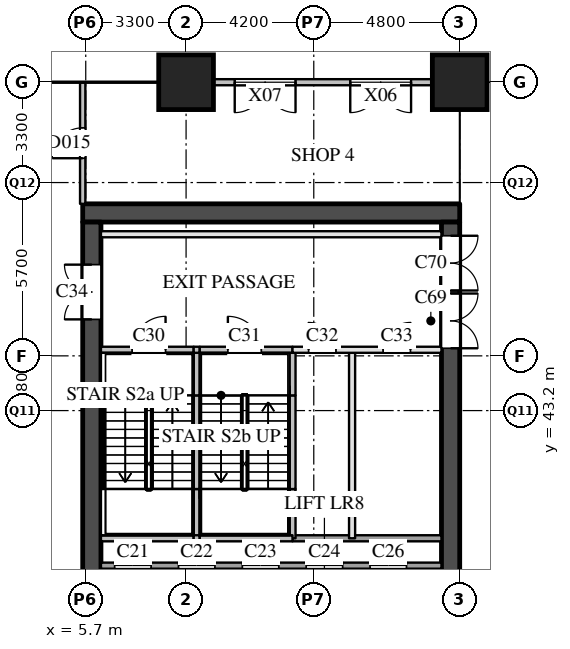
"""IFC4 building model, lengths in metres.
Left out: names, types, materials, properties, quantities, classifications, styles, units other than length and angle.
Written with IfcOpenShell. Run it as: python <this file> out.ifc"""

import sys

from ifc_helpers import new_model, si_unit, direction, frame, frame_2d, origin, origin_2d, place, context, subcontext, project, spatial, rectangle, extrude, element, fill, save


model = new_model("IFC4")
c1 = context("Model", 3, precision=1e-05, world=origin(), true_north=direction((0.0, 1.0)))
c2 = subcontext(c1, "Body", "Model", "MODEL_VIEW")
j1 = project(units=[si_unit("LENGTHUNIT", "METRE"), si_unit("PLANEANGLEUNIT", "RADIAN")], contexts=[c1])
p1 = place(None, origin())
s1 = spatial("IfcSite", under=j1, at=p1, CompositionType="ELEMENT")
p2 = place(p1, origin())
s2 = spatial("IfcBuilding", under=s1, at=p2, CompositionType="ELEMENT")
p3 = place(p2, origin())
s3 = spatial("IfcBuildingStorey", under=s2, at=p3, CompositionType="ELEMENT", Elevation=0.0)
for number, where, z_axis, x_axis in (
    (1, (9.0, 54.0, 0.0), (0.0, 0.0, 1.0), (1.0, 0.0, 0.0)),
    (2, (18.0, 54.0, 0.0), (0.0, 0.0, 1.0), (1.0, 0.0, 0.0)),
):
    element("IfcColumn", number, at=place(p3, frame(where, z_axis=z_axis, x_axis=x_axis)), inside=s3, PredefinedType="COLUMN", context=c2, shape_type="SweptSolid", body=[
        extrude(rectangle(XDim=1.8, YDim=1.8, at=origin_2d()), origin(), (0.0, 0.0, 1.0), 8.0),
    ])
p4 = place(p3, frame((17.1, 54.0, 0.0), z_axis=(0.0, 0.0, 1.0), x_axis=(-1.0, 0.0, 0.0)))
e3 = element("IfcWall", 3, at=p4, inside=s3, PredefinedType="SOLIDWALL", context=c2, shape_type="SweptSolid", body=[
    extrude(rectangle(XDim=7.2, YDim=0.2, at=frame_2d((3.6, 0.0))), origin(), (0.0, 0.0, 1.0), 6.59),
])
p5 = place(p4, frame((0.7, 0.0, 0.0)))
e4 = element("IfcOpeningElement", 4, at=p5, cuts=e3, PredefinedType="OPENING", context=c2, shape_type="SweptSolid", body=[
    extrude(rectangle(XDim=2.0, YDim=2.4, at=frame_2d((1.0, 1.2))), frame((0.0, 0.11, 0.0), z_axis=(0.0, -1.0, 0.0), x_axis=(1.0, 0.0, 0.0)), (0.0, 0.0, 1.0), 0.22),
])
p6 = place(p4, frame((0.7, 0.0, 2.5)))
e5 = element("IfcOpeningElement", 5, at=p6, cuts=e3, PredefinedType="OPENING", context=c2, shape_type="SweptSolid", body=[
    extrude(rectangle(XDim=2.0, YDim=3.99, at=frame_2d((1.0, 1.995))), frame((0.0, 0.11, 0.0), z_axis=(0.0, -1.0, 0.0), x_axis=(1.0, 0.0, 0.0)), (0.0, 0.0, 1.0), 0.22),
])
p7 = place(p4, frame((4.5, 0.0, 0.0)))
e6 = element("IfcOpeningElement", 6, at=p7, cuts=e3, PredefinedType="OPENING", context=c2, shape_type="SweptSolid", body=[
    extrude(rectangle(XDim=2.0, YDim=2.4, at=frame_2d((1.0, 1.2))), frame((0.0, 0.11, 0.0), z_axis=(0.0, -1.0, 0.0), x_axis=(1.0, 0.0, 0.0)), (0.0, 0.0, 1.0), 0.22),
])
p8 = place(p4, frame((4.5, 0.0, 2.5)))
e7 = element("IfcOpeningElement", 7, at=p8, cuts=e3, PredefinedType="OPENING", context=c2, shape_type="SweptSolid", body=[
    extrude(rectangle(XDim=2.0, YDim=3.99, at=frame_2d((1.0, 1.995))), frame((0.0, 0.11, 0.0), z_axis=(0.0, -1.0, 0.0), x_axis=(1.0, 0.0, 0.0)), (0.0, 0.0, 1.0), 0.22),
])
p9 = place(p3, frame((5.6, 49.7, 0.0), z_axis=(0.0, 0.0, 1.0), x_axis=(1.0, 0.0, 0.0)))
e8 = element("IfcWall", 8, at=p9, inside=s3, PredefinedType="SHEAR", context=c2, shape_type="SweptSolid", body=[
    extrude(rectangle(XDim=12.4, YDim=0.6, at=frame_2d((6.2, 0.0))), origin(), (0.0, 0.0, 1.0), 7.59),
])
p10 = place(p3, frame((5.9, 29.1, 0.0), z_axis=(0.0, 0.0, 1.0), x_axis=(0.0, 1.0, 0.0)))
e9 = element("IfcWall", 9, at=p10, inside=s3, PredefinedType="SHEAR", context=c2, shape_type="SweptSolid", body=[
    extrude(rectangle(XDim=20.3, YDim=0.6, at=frame_2d((10.15, 0.0))), origin(), (0.0, 0.0, 1.0), 7.59),
])
p11 = place(p10, frame((3.6, 0.0, 0.0)))
e10 = element("IfcOpeningElement", 10, at=p11, cuts=e9, PredefinedType="OPENING", context=c2, shape_type="SweptSolid", body=[
    extrude(rectangle(XDim=1.8, YDim=2.1, at=frame_2d((0.9, 1.05))), frame((0.0, 0.31, 0.0), z_axis=(0.0, -1.0, 0.0), x_axis=(1.0, 0.0, 0.0)), (0.0, 0.0, 1.0), 0.62),
])
p12 = place(p10, frame((17.1, 0.0, 0.0)))
e11 = element("IfcOpeningElement", 11, at=p12, cuts=e9, PredefinedType="OPENING", context=c2, shape_type="SweptSolid", body=[
    extrude(rectangle(XDim=1.8, YDim=2.1, at=frame_2d((0.9, 1.05))), frame((0.0, 0.31, 0.0), z_axis=(0.0, -1.0, 0.0), x_axis=(1.0, 0.0, 0.0)), (0.0, 0.0, 1.0), 0.62),
])
p13 = place(p3, frame((17.7, 29.1, 0.0), z_axis=(0.0, 0.0, 1.0), x_axis=(0.0, 1.0, 0.0)))
e12 = element("IfcWall", 12, at=p13, inside=s3, PredefinedType="SHEAR", context=c2, shape_type="SweptSolid", body=[
    extrude(rectangle(XDim=20.3, YDim=0.6, at=frame_2d((10.15, 0.0))), origin(), (0.0, 0.0, 1.0), 7.59),
])
p14 = place(p13, frame((1.25, 0.0, 0.0)))
e13 = element("IfcOpeningElement", 13, at=p14, cuts=e12, PredefinedType="OPENING", context=c2, shape_type="SweptSolid", body=[
    extrude(rectangle(XDim=0.7, YDim=2.1, at=frame_2d((0.35, 1.05))), frame((0.0, 0.31, 0.0), z_axis=(0.0, -1.0, 0.0), x_axis=(1.0, 0.0, 0.0)), (0.0, 0.0, 1.0), 0.62),
])
p15 = place(p13, frame((7.05, 0.0, 0.0)))
e14 = element("IfcOpeningElement", 14, at=p15, cuts=e12, PredefinedType="OPENING", context=c2, shape_type="SweptSolid", body=[
    extrude(rectangle(XDim=0.7, YDim=2.1, at=frame_2d((0.35, 1.05))), frame((0.0, 0.31, 0.0), z_axis=(0.0, -1.0, 0.0), x_axis=(1.0, 0.0, 0.0)), (0.0, 0.0, 1.0), 0.62),
])
p16 = place(p13, frame((17.95, 0.0, 0.0), z_axis=(0.0, 0.0, 1.0), x_axis=(-1.0, 0.0, 0.0)))
e15 = element("IfcOpeningElement", 15, at=p16, cuts=e12, PredefinedType="OPENING", context=c2, shape_type="SweptSolid", body=[
    extrude(rectangle(XDim=1.8, YDim=2.4, at=frame_2d((0.9, 1.2))), frame((0.0, 0.31, 0.0), z_axis=(0.0, -1.0, 0.0), x_axis=(1.0, 0.0, 0.0)), (0.0, 0.0, 1.0), 0.62),
])
p17 = place(p13, frame((19.85, 0.0, 0.0), z_axis=(0.0, 0.0, 1.0), x_axis=(-1.0, 0.0, 0.0)))
e16 = element("IfcOpeningElement", 16, at=p17, cuts=e12, PredefinedType="OPENING", context=c2, shape_type="SweptSolid", body=[
    extrude(rectangle(XDim=1.8, YDim=2.4, at=frame_2d((0.9, 1.2))), frame((0.0, 0.31, 0.0), z_axis=(0.0, -1.0, 0.0), x_axis=(1.0, 0.0, 0.0)), (0.0, 0.0, 1.0), 0.62),
])
p18 = place(p3, frame((8.3, 34.9, 0.0), z_axis=(0.0, 0.0, 1.0), x_axis=(0.0, 1.0, 0.0)))
e17 = element("IfcWall", 17, at=p18, inside=s3, PredefinedType="SOLIDWALL", context=c2, shape_type="SweptSolid", body=[
    extrude(rectangle(XDim=3.2, YDim=0.2, at=frame_2d((1.6, 0.0))), origin(), (0.0, 0.0, 1.0), 7.59),
])
p19 = place(p3, frame((9.35, 39.0, 0.0), z_axis=(0.0, 0.0, 1.0), x_axis=(0.0, 1.0, 0.0)))
e18 = element("IfcWall", 18, at=p19, inside=s3, PredefinedType="SOLIDWALL", context=c2, shape_type="SweptSolid", body=[
    extrude(rectangle(XDim=1.62, YDim=0.2, at=frame_2d((0.81, 0.0))), origin(), (0.0, 0.0, 1.0), 7.59),
])
p20 = place(p3, frame((9.35, 40.62, 0.0), z_axis=(0.0, 0.0, 1.0), x_axis=(0.0, 1.0, 0.0)))
e19 = element("IfcWall", 19, at=p20, inside=s3, PredefinedType="SOLIDWALL", context=c2, shape_type="SweptSolid", body=[
    extrude(rectangle(XDim=3.08, YDim=0.2, at=frame_2d((1.54, 0.0))), origin(), (0.0, 0.0, 1.0), 7.59),
])
p21 = place(p3, frame((9.35, 43.7, 0.0), z_axis=(0.0, 0.0, 1.0), x_axis=(0.0, 1.0, 0.0)))
e20 = element("IfcWall", 20, at=p21, inside=s3, PredefinedType="SOLIDWALL", context=c2, shape_type="SweptSolid", body=[
    extrude(rectangle(XDim=1.5, YDim=0.2, at=frame_2d((0.75, 0.0))), origin(), (0.0, 0.0, 1.0), 7.59),
])
for number, where, z_axis, x_axis in (
    (21, (10.4, 34.9, 0.0), (0.0, 0.0, 1.0), (0.0, 1.0, 0.0)),
    (22, (12.5, 34.9, 0.0), (0.0, 0.0, 1.0), (0.0, 1.0, 0.0)),
):
    element("IfcWall", number, at=place(p3, frame(where, z_axis=z_axis, x_axis=x_axis)), inside=s3, PredefinedType="SOLIDWALL", context=c2, shape_type="SweptSolid", body=[
        extrude(rectangle(XDim=3.2, YDim=0.2, at=frame_2d((1.6, 0.0))), origin(), (0.0, 0.0, 1.0), 7.59),
    ])
p22 = place(p3, frame((12.5, 39.0, 0.0), z_axis=(0.0, 0.0, 1.0), x_axis=(0.0, 1.0, 0.0)))
e23 = element("IfcWall", 23, at=p22, inside=s3, PredefinedType="SOLIDWALL", context=c2, shape_type="SweptSolid", body=[
    extrude(rectangle(XDim=1.62, YDim=0.2, at=frame_2d((0.81, 0.0))), origin(), (0.0, 0.0, 1.0), 7.59),
])
p23 = place(p3, frame((12.5, 40.62, 0.0), z_axis=(0.0, 0.0, 1.0), x_axis=(0.0, 1.0, 0.0)))
e24 = element("IfcWall", 24, at=p23, inside=s3, PredefinedType="SOLIDWALL", context=c2, shape_type="SweptSolid", body=[
    extrude(rectangle(XDim=3.08, YDim=0.2, at=frame_2d((1.54, 0.0))), origin(), (0.0, 0.0, 1.0), 7.59),
])
p24 = place(p3, frame((12.5, 43.7, 0.0), z_axis=(0.0, 0.0, 1.0), x_axis=(0.0, 1.0, 0.0)))
e25 = element("IfcWall", 25, at=p24, inside=s3, PredefinedType="SOLIDWALL", context=c2, shape_type="SweptSolid", body=[
    extrude(rectangle(XDim=1.5, YDim=0.2, at=frame_2d((0.75, 0.0))), origin(), (0.0, 0.0, 1.0), 7.59),
])
p25 = place(p3, frame((14.46, 39.0, 0.0), z_axis=(0.0, 0.0, 1.0), x_axis=(0.0, 1.0, 0.0)))
e26 = element("IfcWall", 26, at=p25, inside=s3, PredefinedType="PARTITIONING", context=c2, shape_type="SweptSolid", body=[
    extrude(rectangle(XDim=6.2, YDim=0.2, at=frame_2d((3.1, 0.0))), origin(), (0.0, 0.0, 1.0), 7.59),
])
for number, where, z_axis, x_axis in (
    (27, (14.6, 34.9, 0.0), (0.0, 0.0, 1.0), (0.0, 1.0, 0.0)),
    (28, (16.7, 34.9, 0.0), (0.0, 0.0, 1.0), (0.0, 1.0, 0.0)),
):
    element("IfcWall", number, at=place(p3, frame(where, z_axis=z_axis, x_axis=x_axis)), inside=s3, PredefinedType="SOLIDWALL", context=c2, shape_type="SweptSolid", body=[
        extrude(rectangle(XDim=3.2, YDim=0.2, at=frame_2d((1.6, 0.0))), origin(), (0.0, 0.0, 1.0), 7.59),
    ])
p26 = place(p3, frame((6.2, 38.1, 0.0), z_axis=(0.0, 0.0, 1.0), x_axis=(1.0, 0.0, 0.0)))
e29 = element("IfcWall", 29, at=p26, inside=s3, PredefinedType="SOLIDWALL", context=c2, shape_type="SweptSolid", body=[
    extrude(rectangle(XDim=11.2, YDim=0.2, at=frame_2d((5.6, 0.0))), origin(), (0.0, 0.0, 1.0), 7.59),
])
p27 = place(p26, frame((0.45, 0.0, 0.0)))
e30 = element("IfcOpeningElement", 30, at=p27, cuts=e29, PredefinedType="OPENING", context=c2, shape_type="SweptSolid", body=[
    extrude(rectangle(XDim=1.2, YDim=2.1, at=frame_2d((0.6, 1.05))), frame((0.0, 0.11, 0.0), z_axis=(0.0, -1.0, 0.0), x_axis=(1.0, 0.0, 0.0)), (0.0, 0.0, 1.0), 0.22),
])
p28 = place(p26, frame((2.55, 0.0, 0.0)))
e31 = element("IfcOpeningElement", 31, at=p28, cuts=e29, PredefinedType="OPENING", context=c2, shape_type="SweptSolid", body=[
    extrude(rectangle(XDim=1.2, YDim=2.1, at=frame_2d((0.6, 1.05))), frame((0.0, 0.11, 0.0), z_axis=(0.0, -1.0, 0.0), x_axis=(1.0, 0.0, 0.0)), (0.0, 0.0, 1.0), 0.22),
])
p29 = place(p26, frame((4.65, 0.0, 0.0)))
e32 = element("IfcOpeningElement", 32, at=p29, cuts=e29, PredefinedType="OPENING", context=c2, shape_type="SweptSolid", body=[
    extrude(rectangle(XDim=1.2, YDim=2.1, at=frame_2d((0.6, 1.05))), frame((0.0, 0.11, 0.0), z_axis=(0.0, -1.0, 0.0), x_axis=(1.0, 0.0, 0.0)), (0.0, 0.0, 1.0), 0.22),
])
p30 = place(p26, frame((6.75, 0.0, 0.0)))
e33 = element("IfcOpeningElement", 33, at=p30, cuts=e29, PredefinedType="OPENING", context=c2, shape_type="SweptSolid", body=[
    extrude(rectangle(XDim=1.2, YDim=2.1, at=frame_2d((0.6, 1.05))), frame((0.0, 0.11, 0.0), z_axis=(0.0, -1.0, 0.0), x_axis=(1.0, 0.0, 0.0)), (0.0, 0.0, 1.0), 0.22),
])
p31 = place(p26, frame((8.85, 0.0, 0.0)))
e34 = element("IfcOpeningElement", 34, at=p31, cuts=e29, PredefinedType="OPENING", context=c2, shape_type="SweptSolid", body=[
    extrude(rectangle(XDim=1.2, YDim=2.1, at=frame_2d((0.6, 1.05))), frame((0.0, 0.11, 0.0), z_axis=(0.0, -1.0, 0.0), x_axis=(1.0, 0.0, 0.0)), (0.0, 0.0, 1.0), 0.22),
])
p32 = place(p3, frame((12.5, 39.0, 0.0), z_axis=(0.0, 0.0, 1.0), x_axis=(1.0, 0.0, 0.0)))
e35 = element("IfcWall", 35, at=p32, inside=s3, PredefinedType="SOLIDWALL", context=c2, shape_type="SweptSolid", body=[
    extrude(rectangle(XDim=4.9, YDim=0.2, at=frame_2d((2.45, 0.0))), origin(), (0.0, 0.0, 1.0), 7.59),
])
p33 = place(p3, frame((6.2, 39.0, 0.0), z_axis=(0.0, 0.0, 1.0), x_axis=(1.0, 0.0, 0.0)))
e36 = element("IfcWall", 36, at=p33, inside=s3, PredefinedType="SOLIDWALL", context=c2, shape_type="SweptSolid", body=[
    extrude(rectangle(XDim=3.05, YDim=0.2, at=frame_2d((1.525, 0.0))), origin(), (0.0, 0.0, 1.0), 7.59),
])
p34 = place(p3, frame((9.25, 39.0, 0.0), z_axis=(0.0, 0.0, 1.0), x_axis=(1.0, 0.0, 0.0)))
e37 = element("IfcWall", 37, at=p34, inside=s3, PredefinedType="SOLIDWALL", context=c2, shape_type="SweptSolid", body=[
    extrude(rectangle(XDim=0.2, YDim=0.2, at=frame_2d((0.1, 0.0))), origin(), (0.0, 0.0, 1.0), 7.59),
])
p35 = place(p3, frame((9.45, 39.0, 0.0), z_axis=(0.0, 0.0, 1.0), x_axis=(1.0, 0.0, 0.0)))
e38 = element("IfcWall", 38, at=p35, inside=s3, PredefinedType="SOLIDWALL", context=c2, shape_type="SweptSolid", body=[
    extrude(rectangle(XDim=3.05, YDim=0.2, at=frame_2d((1.525, 0.0))), origin(), (0.0, 0.0, 1.0), 7.59),
])
p36 = place(p3, frame((12.5, 45.2, 0.0), z_axis=(0.0, 0.0, 1.0), x_axis=(1.0, 0.0, 0.0)))
e39 = element("IfcWall", 39, at=p36, inside=s3, PredefinedType="PARTITIONING", context=c2, shape_type="SweptSolid", body=[
    extrude(rectangle(XDim=4.9, YDim=0.2, at=frame_2d((2.45, 0.0))), origin(), (0.0, 0.0, 1.0), 7.59),
])
p37 = place(p36, frame((0.53, 0.0, 0.0)))
e40 = element("IfcOpeningElement", 40, at=p37, cuts=e39, PredefinedType="OPENING", context=c2, shape_type="SweptSolid", body=[
    extrude(rectangle(XDim=0.9, YDim=2.1, at=frame_2d((0.45, 1.05))), frame((0.0, 0.11, 0.0), z_axis=(0.0, -1.0, 0.0), x_axis=(1.0, 0.0, 0.0)), (0.0, 0.0, 1.0), 0.22),
])
p38 = place(p36, frame((2.98, 0.0, 0.0)))
e41 = element("IfcOpeningElement", 41, at=p38, cuts=e39, PredefinedType="OPENING", context=c2, shape_type="SweptSolid", body=[
    extrude(rectangle(XDim=0.9, YDim=2.1, at=frame_2d((0.45, 1.05))), frame((0.0, 0.11, 0.0), z_axis=(0.0, -1.0, 0.0), x_axis=(1.0, 0.0, 0.0)), (0.0, 0.0, 1.0), 0.22),
])
p39 = place(p3, frame((6.2, 45.2, 0.0), z_axis=(0.0, 0.0, 1.0), x_axis=(1.0, 0.0, 0.0)))
e42 = element("IfcWall", 42, at=p39, inside=s3, PredefinedType="SOLIDWALL", context=c2, shape_type="SweptSolid", body=[
    extrude(rectangle(XDim=3.05, YDim=0.2, at=frame_2d((1.525, 0.0))), origin(), (0.0, 0.0, 1.0), 7.59),
])
p40 = place(p39, frame((1.025, 0.0, 0.0)))
e43 = element("IfcOpeningElement", 43, at=p40, cuts=e42, PredefinedType="OPENING", context=c2, shape_type="SweptSolid", body=[
    extrude(rectangle(XDim=1.1, YDim=2.1, at=frame_2d((0.55, 1.05))), frame((0.0, 0.11, 0.0), z_axis=(0.0, -1.0, 0.0), x_axis=(1.0, 0.0, 0.0)), (0.0, 0.0, 1.0), 0.22),
])
p41 = place(p3, frame((9.25, 45.2, 0.0), z_axis=(0.0, 0.0, 1.0), x_axis=(1.0, 0.0, 0.0)))
e44 = element("IfcWall", 44, at=p41, inside=s3, PredefinedType="SOLIDWALL", context=c2, shape_type="SweptSolid", body=[
    extrude(rectangle(XDim=0.2, YDim=0.2, at=frame_2d((0.1, 0.0))), origin(), (0.0, 0.0, 1.0), 7.59),
])
p42 = place(p3, frame((9.45, 45.2, 0.0), z_axis=(0.0, 0.0, 1.0), x_axis=(1.0, 0.0, 0.0)))
e45 = element("IfcWall", 45, at=p42, inside=s3, PredefinedType="SOLIDWALL", context=c2, shape_type="SweptSolid", body=[
    extrude(rectangle(XDim=3.05, YDim=0.2, at=frame_2d((1.525, 0.0))), origin(), (0.0, 0.0, 1.0), 7.59),
])
p43 = place(p42, frame((0.925, 0.0, 0.0)))
e46 = element("IfcOpeningElement", 46, at=p43, cuts=e45, PredefinedType="OPENING", context=c2, shape_type="SweptSolid", body=[
    extrude(rectangle(XDim=1.1, YDim=2.1, at=frame_2d((0.55, 1.05))), frame((0.0, 0.11, 0.0), z_axis=(0.0, -1.0, 0.0), x_axis=(1.0, 0.0, 0.0)), (0.0, 0.0, 1.0), 0.22),
])
p44 = place(p3, frame((6.2, 49.0, 0.0), z_axis=(0.0, 0.0, 1.0), x_axis=(1.0, 0.0, 0.0)))
e47 = element("IfcWall", 47, at=p44, inside=s3, PredefinedType="PARTITIONING", context=c2, shape_type="SweptSolid", body=[
    extrude(rectangle(XDim=11.2, YDim=0.2, at=frame_2d((5.6, 0.0))), origin(), (0.0, 0.0, 1.0), 7.59),
])
p45 = place(p3, frame((5.6, 50.0, 0.0), z_axis=(0.0, 0.0, 1.0), x_axis=(0.0, 1.0, 0.0)))
e48 = element("IfcWall", 48, at=p45, inside=s3, PredefinedType="PARTITIONING", context=c2, shape_type="SweptSolid", body=[
    extrude(rectangle(XDim=4.0, YDim=0.175, at=frame_2d((2.0, 0.0))), origin(), (0.0, 0.0, 1.0), 6.59),
])
p46 = place(p45, frame((1.5, 0.0, 0.0)))
e49 = element("IfcOpeningElement", 49, at=p46, cuts=e48, PredefinedType="OPENING", context=c2, shape_type="SweptSolid", body=[
    extrude(rectangle(XDim=1.0, YDim=2.1, at=frame_2d((0.5, 1.05))), frame((0.0, 0.097, 0.0), z_axis=(0.0, -1.0, 0.0), x_axis=(1.0, 0.0, 0.0)), (0.0, 0.0, 1.0), 0.195),
])
p47 = place(p5, origin())
e50 = element("IfcDoor", 50, at=p47, inside=s3, OperationType="DOUBLE_DOOR_SINGLE_SWING", PredefinedType="DOOR", context=c2, shape_type="SweptSolid", body=[
    extrude(rectangle(XDim=2.0, YDim=2.4, at=frame_2d((1.0, 1.2))), frame((0.0, 0.025, 0.0), z_axis=(0.0, -1.0, 0.0), x_axis=(1.0, 0.0, 0.0)), (0.0, 0.0, 1.0), 0.05),
])
fill(e4, e50)
p48 = place(p6, origin())
e51 = element("IfcWindow", 51, at=p48, inside=s3, PartitioningType="SINGLE_PANEL", PredefinedType="WINDOW", context=c2, shape_type="SweptSolid", body=[
    extrude(rectangle(XDim=2.0, YDim=3.99, at=frame_2d((1.0, 1.995))), frame((0.0, 0.03, 0.0), z_axis=(0.0, -1.0, 0.0), x_axis=(1.0, 0.0, 0.0)), (0.0, 0.0, 1.0), 0.06),
])
fill(e5, e51)
p49 = place(p7, origin())
e52 = element("IfcDoor", 52, at=p49, inside=s3, OperationType="DOUBLE_DOOR_SINGLE_SWING", PredefinedType="DOOR", context=c2, shape_type="SweptSolid", body=[
    extrude(rectangle(XDim=2.0, YDim=2.4, at=frame_2d((1.0, 1.2))), frame((0.0, 0.025, 0.0), z_axis=(0.0, -1.0, 0.0), x_axis=(1.0, 0.0, 0.0)), (0.0, 0.0, 1.0), 0.05),
])
fill(e6, e52)
p50 = place(p8, origin())
e53 = element("IfcWindow", 53, at=p50, inside=s3, PartitioningType="SINGLE_PANEL", PredefinedType="WINDOW", context=c2, shape_type="SweptSolid", body=[
    extrude(rectangle(XDim=2.0, YDim=3.99, at=frame_2d((1.0, 1.995))), frame((0.0, 0.03, 0.0), z_axis=(0.0, -1.0, 0.0), x_axis=(1.0, 0.0, 0.0)), (0.0, 0.0, 1.0), 0.06),
])
fill(e7, e53)
p51 = place(p27, origin())
e54 = element("IfcDoor", 54, at=p51, inside=s3, OperationType="SLIDING_TO_LEFT", PredefinedType="DOOR", context=c2, shape_type="SweptSolid", body=[
    extrude(rectangle(XDim=1.2, YDim=2.1, at=frame_2d((0.6, 1.05))), frame((0.0, 0.025, 0.0), z_axis=(0.0, -1.0, 0.0), x_axis=(1.0, 0.0, 0.0)), (0.0, 0.0, 1.0), 0.05),
])
fill(e30, e54)
p52 = place(p28, origin())
e55 = element("IfcDoor", 55, at=p52, inside=s3, OperationType="SLIDING_TO_LEFT", PredefinedType="DOOR", context=c2, shape_type="SweptSolid", body=[
    extrude(rectangle(XDim=1.2, YDim=2.1, at=frame_2d((0.6, 1.05))), frame((0.0, 0.025, 0.0), z_axis=(0.0, -1.0, 0.0), x_axis=(1.0, 0.0, 0.0)), (0.0, 0.0, 1.0), 0.05),
])
fill(e31, e55)
p53 = place(p29, origin())
e56 = element("IfcDoor", 56, at=p53, inside=s3, OperationType="SLIDING_TO_LEFT", PredefinedType="DOOR", context=c2, shape_type="SweptSolid", body=[
    extrude(rectangle(XDim=1.2, YDim=2.1, at=frame_2d((0.6, 1.05))), frame((0.0, 0.025, 0.0), z_axis=(0.0, -1.0, 0.0), x_axis=(1.0, 0.0, 0.0)), (0.0, 0.0, 1.0), 0.05),
])
fill(e32, e56)
p54 = place(p30, origin())
e57 = element("IfcDoor", 57, at=p54, inside=s3, OperationType="SLIDING_TO_LEFT", PredefinedType="DOOR", context=c2, shape_type="SweptSolid", body=[
    extrude(rectangle(XDim=1.2, YDim=2.1, at=frame_2d((0.6, 1.05))), frame((0.0, 0.025, 0.0), z_axis=(0.0, -1.0, 0.0), x_axis=(1.0, 0.0, 0.0)), (0.0, 0.0, 1.0), 0.05),
])
fill(e33, e57)
p55 = place(p31, origin())
e58 = element("IfcDoor", 58, at=p55, inside=s3, OperationType="SLIDING_TO_LEFT", PredefinedType="DOOR", context=c2, shape_type="SweptSolid", body=[
    extrude(rectangle(XDim=1.2, YDim=2.1, at=frame_2d((0.6, 1.05))), frame((0.0, 0.025, 0.0), z_axis=(0.0, -1.0, 0.0), x_axis=(1.0, 0.0, 0.0)), (0.0, 0.0, 1.0), 0.05),
])
fill(e34, e58)
p56 = place(p40, origin())
e59 = element("IfcDoor", 59, at=p56, inside=s3, OperationType="SINGLE_SWING_RIGHT", PredefinedType="DOOR", context=c2, shape_type="SweptSolid", body=[
    extrude(rectangle(XDim=1.1, YDim=2.1, at=frame_2d((0.55, 1.05))), frame((0.0, 0.025, 0.0), z_axis=(0.0, -1.0, 0.0), x_axis=(1.0, 0.0, 0.0)), (0.0, 0.0, 1.0), 0.05),
])
fill(e43, e59)
p57 = place(p43, origin())
e60 = element("IfcDoor", 60, at=p57, inside=s3, OperationType="SINGLE_SWING_LEFT", PredefinedType="DOOR", context=c2, shape_type="SweptSolid", body=[
    extrude(rectangle(XDim=1.1, YDim=2.1, at=frame_2d((0.55, 1.05))), frame((0.0, 0.025, 0.0), z_axis=(0.0, -1.0, 0.0), x_axis=(1.0, 0.0, 0.0)), (0.0, 0.0, 1.0), 0.05),
])
fill(e46, e60)
p58 = place(p37, origin())
e61 = element("IfcDoor", 61, at=p58, inside=s3, OperationType="SINGLE_SWING_LEFT", PredefinedType="DOOR", context=c2, shape_type="SweptSolid", body=[
    extrude(rectangle(XDim=0.9, YDim=2.1, at=frame_2d((0.45, 1.05))), frame((0.0, 0.025, 0.0), z_axis=(0.0, -1.0, 0.0), x_axis=(1.0, 0.0, 0.0)), (0.0, 0.0, 1.0), 0.05),
])
fill(e40, e61)
p59 = place(p38, origin())
e62 = element("IfcDoor", 62, at=p59, inside=s3, OperationType="SINGLE_SWING_RIGHT", PredefinedType="DOOR", context=c2, shape_type="SweptSolid", body=[
    extrude(rectangle(XDim=0.9, YDim=2.1, at=frame_2d((0.45, 1.05))), frame((0.0, 0.025, 0.0), z_axis=(0.0, -1.0, 0.0), x_axis=(1.0, 0.0, 0.0)), (0.0, 0.0, 1.0), 0.05),
])
fill(e41, e62)
p60 = place(p12, origin())
e63 = element("IfcDoor", 63, at=p60, inside=s3, OperationType="DOUBLE_DOOR_SINGLE_SWING", PredefinedType="DOOR", context=c2, shape_type="SweptSolid", body=[
    extrude(rectangle(XDim=1.8, YDim=2.1, at=frame_2d((0.9, 1.05))), frame((0.0, 0.025, 0.0), z_axis=(0.0, -1.0, 0.0), x_axis=(1.0, 0.0, 0.0)), (0.0, 0.0, 1.0), 0.05),
])
fill(e11, e63)
p61 = place(p16, origin())
e64 = element("IfcDoor", 64, at=p61, inside=s3, OperationType="DOUBLE_DOOR_SINGLE_SWING", PredefinedType="DOOR", context=c2, shape_type="SweptSolid", body=[
    extrude(rectangle(XDim=1.8, YDim=2.4, at=frame_2d((0.9, 1.2))), frame((0.0, 0.025, 0.0), z_axis=(0.0, -1.0, 0.0), x_axis=(1.0, 0.0, 0.0)), (0.0, 0.0, 1.0), 0.05),
])
fill(e15, e64)
p62 = place(p17, origin())
e65 = element("IfcDoor", 65, at=p62, inside=s3, OperationType="DOUBLE_DOOR_SINGLE_SWING", PredefinedType="DOOR", context=c2, shape_type="SweptSolid", body=[
    extrude(rectangle(XDim=1.8, YDim=2.4, at=frame_2d((0.9, 1.2))), frame((0.0, 0.025, 0.0), z_axis=(0.0, -1.0, 0.0), x_axis=(1.0, 0.0, 0.0)), (0.0, 0.0, 1.0), 0.05),
])
fill(e16, e65)
p63 = place(p46, origin())
e66 = element("IfcDoor", 66, at=p63, inside=s3, OperationType="SINGLE_SWING_LEFT", PredefinedType="DOOR", context=c2, shape_type="SweptSolid", body=[
    extrude(rectangle(XDim=1.0, YDim=2.1, at=frame_2d((0.5, 1.05))), frame((0.0, 0.025, 0.0), z_axis=(0.0, -1.0, 0.0), x_axis=(1.0, 0.0, 0.0)), (0.0, 0.0, 1.0), 0.05),
])
fill(e49, e66)
save(model, sys.argv[1])
